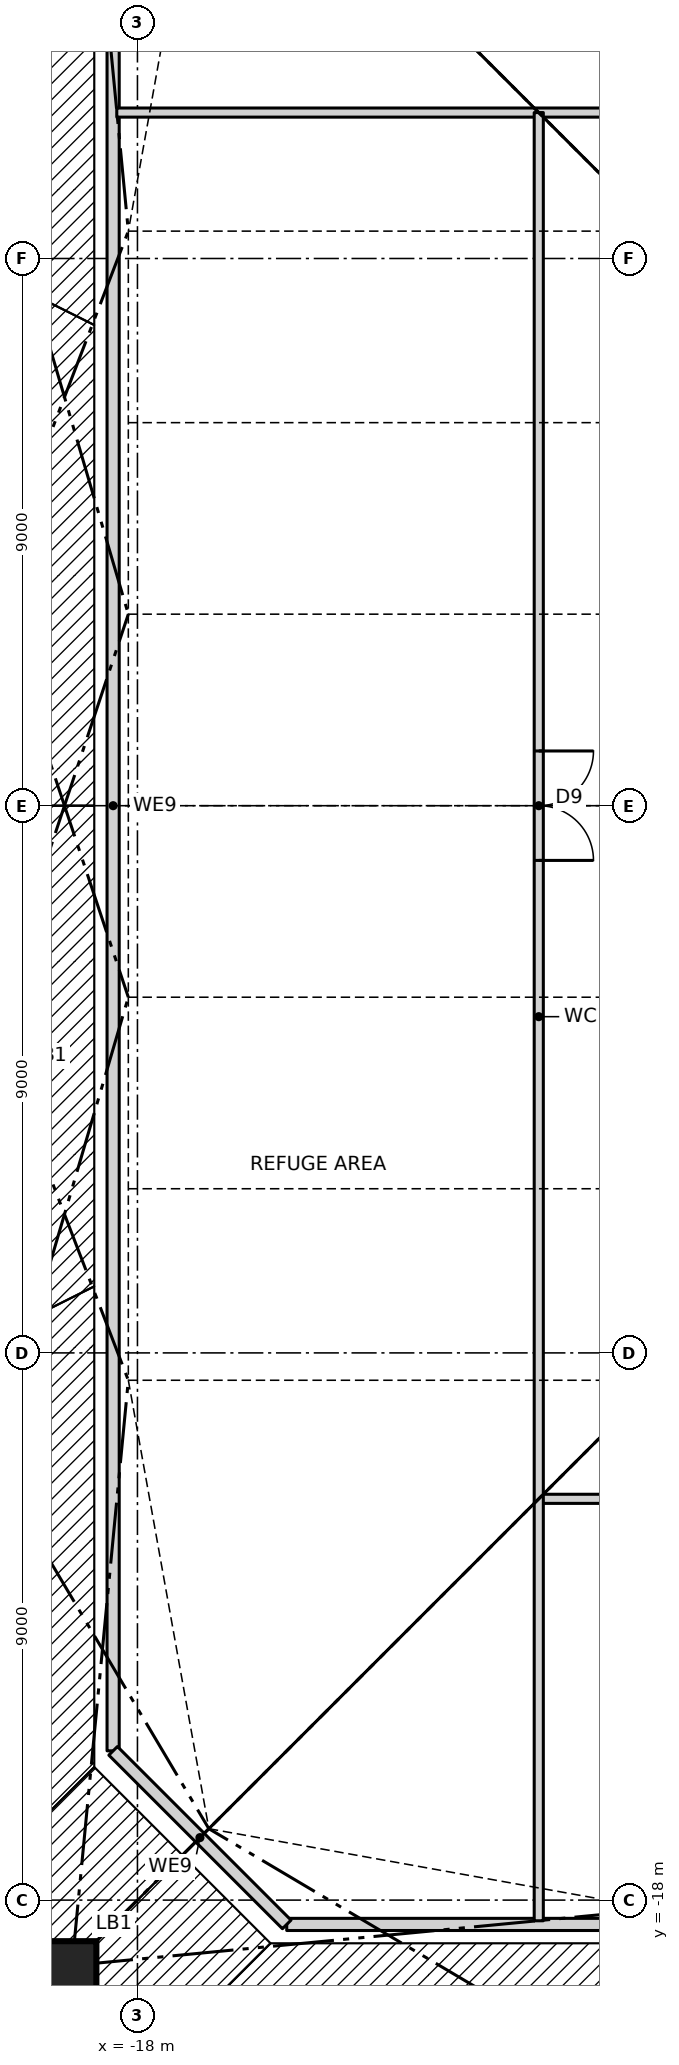
"""IFC4 building model, lengths in metres.
Left out: names, types, materials, properties, quantities, classifications, styles, units other than length and angle.
Written with IfcOpenShell. Run it as: python <this file> out.ifc"""

import sys

from ifc_helpers import new_model, si_unit, direction, frame, frame_2d, origin, origin_2d, place, context, subcontext, project, spatial, rectangle, hollow_rectangle, extrude, clip, halfspace, element, fill, save


model = new_model("IFC4")
c1 = context("Model", 3, precision=1e-05, world=origin(), true_north=direction((0.0, 1.0)))
c2 = subcontext(c1, "Body", "Model", "MODEL_VIEW")
j1 = project(units=[si_unit("LENGTHUNIT", "METRE"), si_unit("PLANEANGLEUNIT", "RADIAN")], contexts=[c1])
p1 = place(None, origin())
s1 = spatial("IfcSite", under=j1, at=p1, CompositionType="ELEMENT")
p2 = place(p1, origin())
s2 = spatial("IfcBuilding", under=s1, at=p2, CompositionType="ELEMENT")
p3 = place(p2, frame((0.0, 0.0, 143.5)))
s3 = spatial("IfcBuildingStorey", under=s2, at=p3, CompositionType="ELEMENT", Elevation=143.5)
p4 = place(p3, frame((-19.076, -19.076, 0.0), z_axis=(0.331294578225, 0.331294578225, 0.883452208599), x_axis=(-0.707106781187, 0.707106781187, 0.0)))
e1 = element("IfcColumn", 1, at=p4, inside=s3, PredefinedType="COLUMN", context=c2, shape_type="Clipping", body=[
    clip(clip(extrude(hollow_rectangle(XDim=0.8, YDim=0.8, WallThickness=0.18, at=origin_2d()), origin(), (0.0, 0.0, 1.0), 6.792), halfspace(frame((0.0, 0.0, 0.0), z_axis=(0.0, -0.468521285666, -0.883452208599), x_axis=(-0.707106781187, -0.624695047554, 0.331294578225)), False)), halfspace(frame((0.0, 2.811, 5.301), z_axis=(0.0, 0.468521285666, 0.883452208599), x_axis=(-0.707106781187, -0.624695047554, 0.331294578225)), False)),
])
p5 = place(p3, frame((-10.8, -20.4, 0.0), z_axis=(0.206163197348, 0.343580475001, 0.916214600002), x_axis=(-0.857476506072, 0.514523120505, 0.0)))
e2 = element("IfcColumn", 2, at=p5, inside=s3, PredefinedType="COLUMN", context=c2, shape_type="Clipping", body=[
    clip(clip(extrude(hollow_rectangle(XDim=0.8, YDim=0.8, WallThickness=0.07, at=origin_2d()), origin(), (0.0, 0.0, 1.0), 6.549), halfspace(frame((0.0, 0.0, 0.0), z_axis=(0.0, -0.400687916891, -0.916214600002), x_axis=(-0.857476506072, -0.471413595046, 0.206163197348)), False)), halfspace(frame((0.0, 2.404, 5.497), z_axis=(0.0, 0.400687916891, 0.916214600002), x_axis=(-0.857476506072, -0.471413595046, 0.206163197348)), False)),
])
p6 = place(p3, frame((-20.4, 10.8, 0.0), z_axis=(0.343580475001, -0.206163197348, 0.916214600002), x_axis=(0.514523120505, 0.857476506072, 0.0)))
e3 = element("IfcColumn", 3, at=p6, inside=s3, PredefinedType="COLUMN", context=c2, shape_type="Clipping", body=[
    clip(clip(extrude(hollow_rectangle(XDim=0.8, YDim=0.8, WallThickness=0.07, at=origin_2d()), origin(), (0.0, 0.0, 1.0), 6.549), halfspace(frame((0.0, 0.0, 0.0), z_axis=(0.0, -0.400687916891, -0.916214600002), x_axis=(0.514523120505, -0.785632494022, 0.343580475001)), False)), halfspace(frame((0.0, 2.404, 5.497), z_axis=(0.0, 0.400687916891, 0.916214600002), x_axis=(0.514523120505, -0.785632494022, 0.343580475001)), False)),
])
p7 = place(p3, frame((-20.4, 3.6, 0.0), z_axis=(0.350260100688, -0.07008242466, 0.934026935168), x_axis=(0.196197979098, 0.980564303347, 0.0)))
e4 = element("IfcColumn", 4, at=p7, inside=s3, PredefinedType="COLUMN", context=c2, shape_type="Clipping", body=[
    clip(clip(extrude(hollow_rectangle(XDim=0.8, YDim=0.8, WallThickness=0.07, at=origin_2d()), origin(), (0.0, 0.0, 1.0), 6.424), halfspace(frame((0.0, 0.0, 0.0), z_axis=(0.0, -0.35720258171, -0.934026935168), x_axis=(0.196197979098, -0.91587347099, 0.350260100688)), False)), halfspace(frame((0.0, 2.143, 5.604), z_axis=(0.0, 0.35720258171, 0.934026935168), x_axis=(0.196197979098, -0.91587347099, 0.350260100688)), False)),
])
p8 = place(p3, frame((-20.4, -3.6, 0.0), z_axis=(0.350260100688, 0.07008242466, 0.934026935168), x_axis=(-0.196197979098, 0.980564303347, 0.0)))
e5 = element("IfcColumn", 5, at=p8, inside=s3, PredefinedType="COLUMN", context=c2, shape_type="Clipping", body=[
    clip(clip(extrude(hollow_rectangle(XDim=0.8, YDim=0.8, WallThickness=0.07, at=origin_2d()), origin(), (0.0, 0.0, 1.0), 6.424), halfspace(frame((0.0, 0.0, 0.0), z_axis=(0.0, -0.35720258171, -0.934026935168), x_axis=(-0.196197979098, -0.91587347099, 0.350260100688)), False)), halfspace(frame((0.0, 2.143, 5.604), z_axis=(0.0, 0.35720258171, 0.934026935168), x_axis=(-0.196197979098, -0.91587347099, 0.350260100688)), False)),
])
p9 = place(p3, frame((-20.4, -10.8, 0.0), z_axis=(0.343580475001, 0.206163197348, 0.916214600002), x_axis=(-0.514523120505, 0.857476506072, 0.0)))
e6 = element("IfcColumn", 6, at=p9, inside=s3, PredefinedType="COLUMN", context=c2, shape_type="Clipping", body=[
    clip(clip(extrude(hollow_rectangle(XDim=0.8, YDim=0.8, WallThickness=0.07, at=origin_2d()), origin(), (0.0, 0.0, 1.0), 6.549), halfspace(frame((0.0, 0.0, 0.0), z_axis=(0.0, -0.400687916891, -0.916214600002), x_axis=(-0.514523120505, -0.785632494022, 0.343580475001)), False)), halfspace(frame((0.0, 2.404, 5.497), z_axis=(0.0, 0.400687916891, 0.916214600002), x_axis=(-0.514523120505, -0.785632494022, 0.343580475001)), False)),
])
for number, where, z_axis, x_axis in (
    (7, (-15.545, -18.4, 0.0), (0.0, 0.0, 1.0), (1.0, 0.0, 0.0)),
    (8, (-18.4, 15.545, 0.0), (0.0, 0.0, 1.0), (0.0, -1.0, 0.0)),
):
    element("IfcWall", number, at=place(p3, frame(where, z_axis=z_axis, x_axis=x_axis)), inside=s3, PredefinedType="PARTITIONING", context=c2, shape_type="SweptSolid", body=[
        extrude(rectangle(XDim=31.09, YDim=0.2, at=frame_2d((15.545, 0.0))), origin(), (0.0, 0.0, 1.0), 5.7),
    ])
p10 = place(p3, frame((-18.4, -15.545, 0.0), z_axis=(0.0, 0.0, 1.0), x_axis=(0.707106781187, -0.707106781187, 0.0)))
e9 = element("IfcWall", 9, at=p10, inside=s3, PredefinedType="PARTITIONING", context=c2, shape_type="SweptSolid", body=[
    extrude(rectangle(XDim=4.038, YDim=0.2, at=frame_2d((2.019, 0.0))), origin(), (0.0, 0.0, 1.0), 5.7),
])
p11 = place(p3, frame((-11.4, -11.4, 0.0), z_axis=(0.0, 0.0, 1.0), x_axis=(1.0, 0.0, 0.0)))
e10 = element("IfcWall", 10, at=p11, inside=s3, PredefinedType="PARTITIONING", context=c2, shape_type="SweptSolid", body=[
    extrude(rectangle(XDim=29.74, YDim=0.15, at=frame_2d((14.87, 0.0))), origin(), (0.0, 0.0, 1.0), 5.77),
])
p12 = place(p11, frame((4.1, 0.0, 0.0)))
e11 = element("IfcOpeningElement", 11, at=p12, cuts=e10, PredefinedType="OPENING", context=c2, shape_type="SweptSolid", body=[
    extrude(rectangle(XDim=1.8, YDim=2.1, at=frame_2d((0.9, 1.05))), frame((0.0, 0.085, 0.0), z_axis=(0.0, -1.0, 0.0), x_axis=(1.0, 0.0, 0.0)), (0.0, 0.0, 1.0), 0.17),
])
p13 = place(p11, frame((12.6, 0.0, 0.0)))
e12 = element("IfcOpeningElement", 12, at=p13, cuts=e10, PredefinedType="OPENING", context=c2, shape_type="SweptSolid", body=[
    extrude(rectangle(XDim=1.8, YDim=2.1, at=frame_2d((0.9, 1.05))), frame((0.0, 0.085, 0.0), z_axis=(0.0, -1.0, 0.0), x_axis=(1.0, 0.0, 0.0)), (0.0, 0.0, 1.0), 0.17),
])
p14 = place(p11, frame((19.0, 0.0, 0.0)))
e13 = element("IfcOpeningElement", 13, at=p14, cuts=e10, PredefinedType="OPENING", context=c2, shape_type="SweptSolid", body=[
    extrude(rectangle(XDim=1.8, YDim=2.1, at=frame_2d((0.9, 1.05))), frame((0.0, 0.085, 0.0), z_axis=(0.0, -1.0, 0.0), x_axis=(1.0, 0.0, 0.0)), (0.0, 0.0, 1.0), 0.17),
])
p15 = place(p3, frame((-18.34, 11.4, 0.0), z_axis=(0.0, 0.0, 1.0), x_axis=(1.0, 0.0, 0.0)))
e14 = element("IfcWall", 14, at=p15, inside=s3, PredefinedType="PARTITIONING", context=c2, shape_type="SweptSolid", body=[
    extrude(rectangle(XDim=29.74, YDim=0.15, at=frame_2d((14.87, 0.0))), origin(), (0.0, 0.0, 1.0), 5.77),
])
p16 = place(p15, frame((25.34, 0.0, 0.0)))
e15 = element("IfcOpeningElement", 15, at=p16, cuts=e14, PredefinedType="OPENING", context=c2, shape_type="SweptSolid", body=[
    extrude(rectangle(XDim=1.8, YDim=2.1, at=frame_2d((0.9, 1.05))), frame((0.0, 0.085, 0.0), z_axis=(0.0, -1.0, 0.0), x_axis=(1.0, 0.0, 0.0)), (0.0, 0.0, 1.0), 0.17),
])
p17 = place(p15, frame((17.84, 0.0, 0.0)))
e16 = element("IfcOpeningElement", 16, at=p17, cuts=e14, PredefinedType="OPENING", context=c2, shape_type="SweptSolid", body=[
    extrude(rectangle(XDim=1.8, YDim=2.1, at=frame_2d((0.9, 1.05))), frame((0.0, 0.085, 0.0), z_axis=(0.0, -1.0, 0.0), x_axis=(1.0, 0.0, 0.0)), (0.0, 0.0, 1.0), 0.17),
])
p18 = place(p15, frame((9.94, 0.0, 0.0)))
e17 = element("IfcOpeningElement", 17, at=p18, cuts=e14, PredefinedType="OPENING", context=c2, shape_type="SweptSolid", body=[
    extrude(rectangle(XDim=1.8, YDim=2.1, at=frame_2d((0.9, 1.05))), frame((0.0, 0.085, 0.0), z_axis=(0.0, -1.0, 0.0), x_axis=(1.0, 0.0, 0.0)), (0.0, 0.0, 1.0), 0.17),
])
p19 = place(p3, frame((-11.4, -18.34, 0.0), z_axis=(0.0, 0.0, 1.0), x_axis=(0.0, 1.0, 0.0)))
e18 = element("IfcWall", 18, at=p19, inside=s3, PredefinedType="PARTITIONING", context=c2, shape_type="SweptSolid", body=[
    extrude(rectangle(XDim=29.74, YDim=0.15, at=frame_2d((14.87, 0.0))), origin(), (0.0, 0.0, 1.0), 5.77),
])
p20 = place(p19, frame((17.44, 0.0, 0.0)))
e19 = element("IfcOpeningElement", 19, at=p20, cuts=e18, PredefinedType="OPENING", context=c2, shape_type="SweptSolid", body=[
    extrude(rectangle(XDim=1.8, YDim=2.1, at=frame_2d((0.9, 1.05))), frame((0.0, 0.085, 0.0), z_axis=(0.0, -1.0, 0.0), x_axis=(1.0, 0.0, 0.0)), (0.0, 0.0, 1.0), 0.17),
])
p21 = place(p20, frame((1.8, 0.0, 0.0), z_axis=(0.0, 0.0, 1.0), x_axis=(-1.0, 0.0, 0.0)))
e20 = element("IfcDoor", 20, at=p21, inside=s3, OperationType="DOUBLE_DOOR_SINGLE_SWING", PredefinedType="DOOR", context=c2, shape_type="SweptSolid", body=[
    extrude(rectangle(XDim=1.8, YDim=2.1, at=frame_2d((0.9, 1.05))), frame((0.0, 0.025, 0.0), z_axis=(0.0, -1.0, 0.0), x_axis=(1.0, 0.0, 0.0)), (0.0, 0.0, 1.0), 0.05),
])
fill(e19, e20)
save(model, sys.argv[1])
